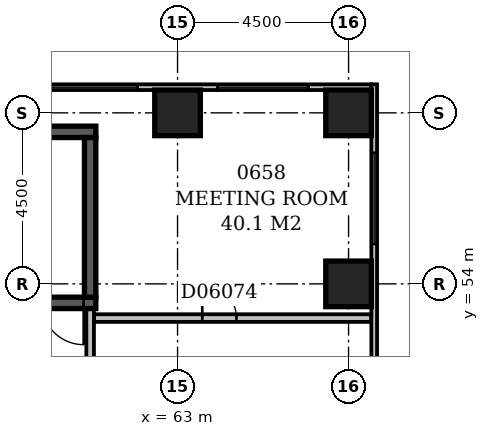
"""IFC4 building model, lengths in metres.
Left out: names, types, materials, properties, quantities, classifications, styles, units other than length and angle.
Written with IfcOpenShell. Run it as: python <this file> out.ifc"""

import sys

from ifc_helpers import new_model, si_unit, direction, frame, frame_2d, origin, origin_2d, place, context, subcontext, project, spatial, rectangle, extrude, element, fill, save


model = new_model("IFC4")
c1 = context("Model", 3, precision=1e-05, world=origin(), true_north=direction((0.0, 1.0)))
c2 = subcontext(c1, "Body", "Model", "MODEL_VIEW")
j1 = project(units=[si_unit("LENGTHUNIT", "METRE"), si_unit("PLANEANGLEUNIT", "RADIAN")], contexts=[c1])
p1 = place(None, origin())
s1 = spatial("IfcSite", under=j1, at=p1, CompositionType="ELEMENT")
p2 = place(p1, origin())
s2 = spatial("IfcBuilding", under=s1, at=p2, CompositionType="ELEMENT")
p3 = place(p2, frame((0.0, 0.0, 32.6)))
s3 = spatial("IfcBuildingStorey", under=s2, at=p3, CompositionType="ELEMENT", Elevation=32.6)
p4 = place(p3, frame((53.85, 53.5, -0.3), z_axis=(0.0, 0.0, 1.0), x_axis=(1.0, 0.0, 0.0)))
e1 = element("IfcWall", 1, at=p4, inside=s3, PredefinedType="SHEAR", context=c2, shape_type="SweptSolid", body=[
    extrude(rectangle(XDim=7.0, YDim=0.3, at=frame_2d((3.5, 0.0))), origin(), (0.0, 0.0, 1.0), 3.6),
])
p5 = place(p4, frame((5.58, 0.0, 0.3)))
e2 = element("IfcOpeningElement", 2, at=p5, cuts=e1, PredefinedType="OPENING", context=c2, shape_type="SweptSolid", body=[
    extrude(rectangle(XDim=1.1, YDim=2.1, at=frame_2d((0.55, 1.05))), frame((0.0, 0.162, 0.0), z_axis=(0.0, -1.0, 0.0), x_axis=(1.0, 0.0, 0.0)), (0.0, 0.0, 1.0), 0.324),
])
p6 = place(p3, frame((53.85, 58.0, -0.3), z_axis=(0.0, 0.0, 1.0), x_axis=(1.0, 0.0, 0.0)))
e3 = element("IfcWall", 3, at=p6, inside=s3, PredefinedType="SHEAR", context=c2, shape_type="SweptSolid", body=[
    extrude(rectangle(XDim=7.0, YDim=0.3, at=frame_2d((3.5, 0.0))), origin(), (0.0, 0.0, 1.0), 3.6),
])
p7 = place(p3, frame((60.7, 53.65, -0.3), z_axis=(0.0, 0.0, 1.0), x_axis=(0.0, 1.0, 0.0)))
e4 = element("IfcWall", 4, at=p7, inside=s3, PredefinedType="SHEAR", context=c2, shape_type="SweptSolid", body=[
    extrude(rectangle(XDim=4.2, YDim=0.3, at=frame_2d((2.1, 0.0))), origin(), (0.0, 0.0, 1.0), 3.6),
])
for number, where, z_axis, x_axis in (
    (5, (67.5, 54.0, -0.3), (0.0, 0.0, 1.0), (1.0, 0.0, 0.0)),
    (6, (63.0, 58.5, -0.3), (0.0, 0.0, 1.0), (1.0, 0.0, 0.0)),
    (7, (67.5, 58.5, -0.3), (0.0, 0.0, 1.0), (1.0, 0.0, 0.0)),
):
    element("IfcColumn", number, at=place(p3, frame(where, z_axis=z_axis, x_axis=x_axis)), inside=s3, PredefinedType="COLUMN", context=c2, shape_type="SweptSolid", body=[
        extrude(rectangle(XDim=1.2, YDim=1.2, at=origin_2d()), origin(), (0.0, 0.0, 1.0), 3.6),
    ])
p8 = place(p3, frame((68.175, 35.4, 0.0), z_axis=(0.0, 0.0, 1.0), x_axis=(0.0, 1.0, 0.0)))
e8 = element("IfcWall", 8, at=p8, inside=s3, PredefinedType="STANDARD", context=c2, shape_type="SweptSolid", body=[
    extrude(rectangle(XDim=23.85, YDim=0.15, at=frame_2d((11.925, 0.0))), origin(), (0.0, 0.0, 1.0), 2.7),
])
p9 = place(p8, frame((1.65, 0.0, 0.6)))
e9 = element("IfcOpeningElement", 9, at=p9, cuts=e8, PredefinedType="OPENING", context=c2, shape_type="SweptSolid", body=[
    extrude(rectangle(XDim=2.4, YDim=1.8, at=frame_2d((1.2, 0.9))), frame((0.0, 0.087, 0.0), z_axis=(0.0, -1.0, 0.0), x_axis=(1.0, 0.0, 0.0)), (0.0, 0.0, 1.0), 0.174),
])
p10 = place(p8, frame((19.65, 0.0, 0.6)))
e10 = element("IfcOpeningElement", 10, at=p10, cuts=e8, PredefinedType="OPENING", context=c2, shape_type="SweptSolid", body=[
    extrude(rectangle(XDim=2.4, YDim=1.8, at=frame_2d((1.2, 0.9))), frame((0.0, 0.087, 0.0), z_axis=(0.0, -1.0, 0.0), x_axis=(1.0, 0.0, 0.0)), (0.0, 0.0, 1.0), 0.174),
])
p11 = place(p3, frame((68.1, 59.175, 0.0), z_axis=(0.0, 0.0, 1.0), x_axis=(-1.0, 0.0, 0.0)))
e11 = element("IfcWall", 11, at=p11, inside=s3, PredefinedType="STANDARD", context=c2, shape_type="SweptSolid", body=[
    extrude(rectangle(XDim=68.85, YDim=0.15, at=frame_2d((34.425, 0.0))), origin(), (0.0, 0.0, 1.0), 2.7),
])
p12 = place(p11, frame((1.65, 0.0, 0.6)))
e12 = element("IfcOpeningElement", 12, at=p12, cuts=e11, PredefinedType="OPENING", context=c2, shape_type="SweptSolid", body=[
    extrude(rectangle(XDim=2.4, YDim=1.8, at=frame_2d((1.2, 0.9))), frame((0.0, 0.087, 0.0), z_axis=(0.0, -1.0, 0.0), x_axis=(1.0, 0.0, 0.0)), (0.0, 0.0, 1.0), 0.174),
])
p13 = place(p11, frame((6.15, 0.0, 0.6)))
e13 = element("IfcOpeningElement", 13, at=p13, cuts=e11, PredefinedType="OPENING", context=c2, shape_type="SweptSolid", body=[
    extrude(rectangle(XDim=2.4, YDim=1.8, at=frame_2d((1.2, 0.9))), frame((0.0, 0.087, 0.0), z_axis=(0.0, -1.0, 0.0), x_axis=(1.0, 0.0, 0.0)), (0.0, 0.0, 1.0), 0.174),
])
p14 = place(p11, frame((38.67, 0.0, 0.6)))
e14 = element("IfcOpeningElement", 14, at=p14, cuts=e11, PredefinedType="OPENING", context=c2, shape_type="SweptSolid", body=[
    extrude(rectangle(XDim=1.5, YDim=1.8, at=frame_2d((0.75, 0.9))), frame((0.0, 0.087, 0.0), z_axis=(0.0, -1.0, 0.0), x_axis=(1.0, 0.0, 0.0)), (0.0, 0.0, 1.0), 0.174),
])
p15 = place(p3, frame((60.7, 51.6, 0.0), z_axis=(0.0, 0.0, 1.0), x_axis=(0.0, 1.0, 0.0)))
e15 = element("IfcWall", 15, at=p15, inside=s3, PredefinedType="PARTITIONING", context=c2, shape_type="SweptSolid", body=[
    extrude(rectangle(XDim=1.73, YDim=0.2, at=frame_2d((0.865, 0.0))), origin(), (0.0, 0.0, 1.0), 3.3),
])
p16 = place(p3, frame((60.8, 53.1, 0.0), z_axis=(0.0, 0.0, 1.0), x_axis=(1.0, 0.0, 0.0)))
e16 = element("IfcWall", 16, at=p16, inside=s3, PredefinedType="PARTITIONING", context=c2, shape_type="SweptSolid", body=[
    extrude(rectangle(XDim=7.3, YDim=0.2, at=frame_2d((3.65, 0.0))), origin(), (0.0, 0.0, 1.0), 3.3),
])
p17 = place(p16, frame((2.85, 0.0, 0.0)))
e17 = element("IfcOpeningElement", 17, at=p17, cuts=e16, PredefinedType="OPENING", context=c2, shape_type="SweptSolid", body=[
    extrude(rectangle(XDim=0.9, YDim=2.1, at=frame_2d((0.45, 1.05))), frame((0.0, 0.112, 0.0), z_axis=(0.0, -1.0, 0.0), x_axis=(1.0, 0.0, 0.0)), (0.0, 0.0, 1.0), 0.224),
])
p18 = place(p10, origin())
e18 = element("IfcWindow", 18, at=p18, inside=s3, PartitioningType="SINGLE_PANEL", PredefinedType="WINDOW", context=c2, shape_type="SweptSolid", body=[
    extrude(rectangle(XDim=2.4, YDim=1.8, at=frame_2d((1.2, 0.9))), frame((0.0, 0.03, 0.0), z_axis=(0.0, -1.0, 0.0), x_axis=(1.0, 0.0, 0.0)), (0.0, 0.0, 1.0), 0.06),
])
fill(e10, e18)
p19 = place(p12, origin())
e19 = element("IfcWindow", 19, at=p19, inside=s3, PartitioningType="SINGLE_PANEL", PredefinedType="WINDOW", context=c2, shape_type="SweptSolid", body=[
    extrude(rectangle(XDim=2.4, YDim=1.8, at=frame_2d((1.2, 0.9))), frame((0.0, 0.03, 0.0), z_axis=(0.0, -1.0, 0.0), x_axis=(1.0, 0.0, 0.0)), (0.0, 0.0, 1.0), 0.06),
])
fill(e12, e19)
p20 = place(p13, origin())
e20 = element("IfcWindow", 20, at=p20, inside=s3, PartitioningType="SINGLE_PANEL", PredefinedType="WINDOW", context=c2, shape_type="SweptSolid", body=[
    extrude(rectangle(XDim=2.4, YDim=1.8, at=frame_2d((1.2, 0.9))), frame((0.0, 0.03, 0.0), z_axis=(0.0, -1.0, 0.0), x_axis=(1.0, 0.0, 0.0)), (0.0, 0.0, 1.0), 0.06),
])
fill(e13, e20)
p21 = place(p5, origin())
e21 = element("IfcDoor", 21, at=p21, inside=s3, OperationType="SINGLE_SWING_RIGHT", PredefinedType="DOOR", context=c2, shape_type="SweptSolid", body=[
    extrude(rectangle(XDim=1.1, YDim=2.1, at=frame_2d((0.55, 1.05))), frame((0.0, 0.025, 0.0), z_axis=(0.0, -1.0, 0.0), x_axis=(1.0, 0.0, 0.0)), (0.0, 0.0, 1.0), 0.05),
])
fill(e2, e21)
p22 = place(p17, origin())
e22 = element("IfcDoor", 22, at=p22, inside=s3, OperationType="SINGLE_SWING_LEFT", PredefinedType="DOOR", context=c2, shape_type="SweptSolid", body=[
    extrude(rectangle(XDim=0.9, YDim=2.1, at=frame_2d((0.45, 1.05))), frame((0.0, 0.025, 0.0), z_axis=(0.0, -1.0, 0.0), x_axis=(1.0, 0.0, 0.0)), (0.0, 0.0, 1.0), 0.05),
])
fill(e17, e22)
save(model, sys.argv[1])
